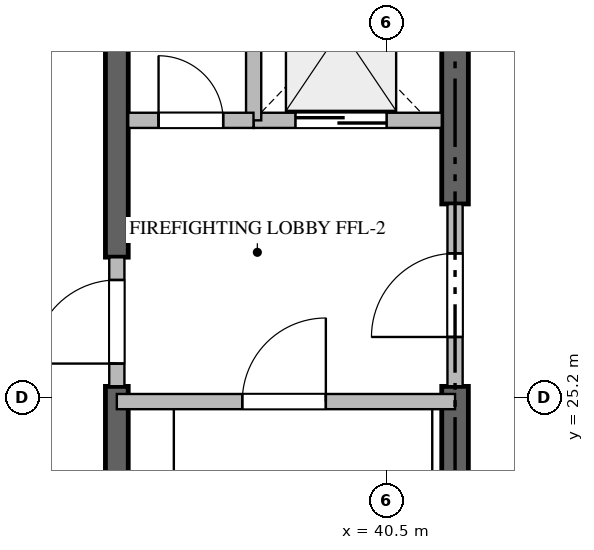
"""IFC4 building model, lengths in metres.
Left out: names, types, materials, properties, quantities, classifications, styles, units other than length and angle.
Written with IfcOpenShell. Run it as: python <this file> out.ifc"""

import sys

from ifc_helpers import new_model, si_unit, direction, frame, frame_2d, origin, place, context, subcontext, project, spatial, rectangle, extrude, source, transform, mapped, element, fill, save


model = new_model("IFC4")
c1 = context("Model", 3, precision=1e-05, world=origin(), true_north=direction((0.0, 1.0)))
c2 = subcontext(c1, "Body", "Model", "MODEL_VIEW")
j1 = project(units=[si_unit("LENGTHUNIT", "METRE"), si_unit("PLANEANGLEUNIT", "RADIAN")], contexts=[c1])
p1 = place(None, origin())
s1 = spatial("IfcSite", under=j1, at=p1, CompositionType="ELEMENT")
p2 = place(p1, origin())
s2 = spatial("IfcBuilding", under=s1, at=p2, CompositionType="ELEMENT")
p3 = place(p2, frame((0.0, 0.0, 353.85)))
s3 = spatial("IfcBuildingStorey", under=s2, at=p3, CompositionType="ELEMENT", Elevation=353.85)
p4 = place(p3, frame((41.4, 16.975, -0.26), z_axis=(0.0, 0.0, 1.0), x_axis=(0.0, 1.0, 0.0)))
e1 = element("IfcWall", 1, at=p4, inside=s3, PredefinedType="SHEAR", context=c2, shape_type="SweptSolid", body=[
    extrude(rectangle(XDim=8.375, YDim=0.35, at=frame_2d((4.188, 0.0))), origin(), (0.0, 0.0, 1.0), 5.798),
])
p5 = place(p3, frame((41.4, 27.75, -0.26), z_axis=(0.0, 0.0, 1.0), x_axis=(0.0, 1.0, 0.0)))
e2 = element("IfcWall", 2, at=p5, inside=s3, PredefinedType="SHEAR", context=c2, shape_type="SweptSolid", body=[
    extrude(rectangle(XDim=5.675, YDim=0.35, at=frame_2d((2.837, 0.0))), origin(), (0.0, 0.0, 1.0), 5.798),
])
p6 = place(p3, frame((36.95, 16.975, -0.26), z_axis=(0.0, 0.0, 1.0), x_axis=(0.0, 1.0, 0.0)))
e3 = element("IfcWall", 3, at=p6, inside=s3, PredefinedType="SHEAR", context=c2, shape_type="SweptSolid", body=[
    extrude(rectangle(XDim=8.375, YDim=0.3, at=frame_2d((4.188, 0.0))), origin(), (0.0, 0.0, 1.0), 5.798),
])
p7 = place(p3, frame((36.95, 27.05, -0.26), z_axis=(0.0, 0.0, 1.0), x_axis=(0.0, 1.0, 0.0)))
e4 = element("IfcWall", 4, at=p7, inside=s3, PredefinedType="SHEAR", context=c2, shape_type="SweptSolid", body=[
    extrude(rectangle(XDim=6.375, YDim=0.3, at=frame_2d((3.188, 0.0))), origin(), (0.0, 0.0, 1.0), 5.798),
])
p8 = place(p3, frame((36.95, 25.15, 0.0), z_axis=(0.0, 0.0, 1.0), x_axis=(1.0, 0.0, 0.0)))
e5 = element("IfcWall", 5, at=p8, inside=s3, PredefinedType="STANDARD", context=c2, shape_type="SweptSolid", body=[
    extrude(rectangle(XDim=4.45, YDim=0.2, at=frame_2d((2.225, 0.0))), origin(), (0.0, 0.0, 1.0), 5.54),
])
p9 = place(p8, frame((1.65, 0.0, 0.0)))
e6 = element("IfcOpeningElement", 6, at=p9, cuts=e5, PredefinedType="OPENING", context=c2, shape_type="SweptSolid", body=[
    extrude(rectangle(XDim=1.1, YDim=2.15, at=frame_2d((0.55, 1.075))), frame((0.0, 0.11, 0.0), z_axis=(0.0, -1.0, 0.0), x_axis=(1.0, 0.0, 0.0)), (0.0, 0.0, 1.0), 0.22),
])
p10 = place(p3, frame((38.75, 28.85, 0.0), z_axis=(0.0, 0.0, 1.0), x_axis=(1.0, 0.0, 0.0)))
e7 = element("IfcWall", 7, at=p10, inside=s3, PredefinedType="STANDARD", context=c2, shape_type="SweptSolid", body=[
    extrude(rectangle(XDim=2.475, YDim=0.2, at=frame_2d((1.238, 0.0))), origin(), (0.0, 0.0, 1.0), 5.54),
])
p11 = place(p10, frame((0.55, 0.0, 0.0)))
e8 = element("IfcOpeningElement", 8, at=p11, cuts=e7, PredefinedType="OPENING", context=c2, shape_type="SweptSolid", body=[
    extrude(rectangle(XDim=1.2, YDim=2.2, at=frame_2d((0.6, 1.1))), frame((0.0, 0.11, 0.0), z_axis=(0.0, -1.0, 0.0), x_axis=(1.0, 0.0, 0.0)), (0.0, 0.0, 1.0), 0.22),
])
p12 = place(p3, frame((38.75, 28.85, 0.0), z_axis=(0.0, 0.0, 1.0), x_axis=(0.0, 1.0, 0.0)))
e9 = element("IfcWall", 9, at=p12, inside=s3, PredefinedType="STANDARD", context=c2, shape_type="SweptSolid", body=[
    extrude(rectangle(XDim=2.5, YDim=0.2, at=frame_2d((1.25, 0.0))), origin(), (0.0, 0.0, 1.0), 5.54),
])
p13 = place(p3, frame((37.1, 28.85, 0.0), z_axis=(0.0, 0.0, 1.0), x_axis=(1.0, 0.0, 0.0)))
e10 = element("IfcWall", 10, at=p13, inside=s3, PredefinedType="STANDARD", context=c2, shape_type="SweptSolid", body=[
    extrude(rectangle(XDim=1.648, YDim=0.2, at=frame_2d((0.824, 0.0))), origin(), (0.0, 0.0, 1.0), 5.54),
])
p14 = place(p13, frame((0.399, 0.0, 0.0)))
e11 = element("IfcOpeningElement", 11, at=p14, cuts=e10, PredefinedType="OPENING", context=c2, shape_type="SweptSolid", body=[
    extrude(rectangle(XDim=0.85, YDim=2.1, at=frame_2d((0.425, 1.05))), frame((0.0, 0.11, 0.0), z_axis=(0.0, -1.0, 0.0), x_axis=(1.0, 0.0, 0.0)), (0.0, 0.0, 1.0), 0.22),
])
p15 = place(p3, frame((41.4, 25.352, 0.0), z_axis=(0.0, 0.0, 1.0), x_axis=(0.0, 1.0, 0.0)))
e12 = element("IfcWall", 12, at=p15, inside=s3, PredefinedType="STANDARD", context=c2, shape_type="SweptSolid", body=[
    extrude(rectangle(XDim=2.396, YDim=0.2, at=frame_2d((1.198, 0.0))), origin(), (0.0, 0.0, 1.0), 5.54),
])
p16 = place(p15, frame((0.648, 0.0, 0.0)))
e13 = element("IfcOpeningElement", 13, at=p16, cuts=e12, PredefinedType="OPENING", context=c2, shape_type="SweptSolid", body=[
    extrude(rectangle(XDim=1.1, YDim=2.15, at=frame_2d((0.55, 1.075))), frame((0.0, 0.11, 0.0), z_axis=(0.0, -1.0, 0.0), x_axis=(1.0, 0.0, 0.0)), (0.0, 0.0, 1.0), 0.22),
])
p17 = place(p3, frame((36.95, 25.352, 0.0), z_axis=(0.0, 0.0, 1.0), x_axis=(0.0, 1.0, 0.0)))
e14 = element("IfcWall", 14, at=p17, inside=s3, PredefinedType="STANDARD", context=c2, shape_type="SweptSolid", body=[
    extrude(rectangle(XDim=1.696, YDim=0.2, at=frame_2d((0.848, 0.0))), origin(), (0.0, 0.0, 1.0), 5.54),
])
p18 = place(p17, frame((0.298, 0.0, 0.0)))
e15 = element("IfcOpeningElement", 15, at=p18, cuts=e14, PredefinedType="OPENING", context=c2, shape_type="SweptSolid", body=[
    extrude(rectangle(XDim=1.1, YDim=2.15, at=frame_2d((0.55, 1.075))), frame((0.0, 0.11, 0.0), z_axis=(0.0, -1.0, 0.0), x_axis=(1.0, 0.0, 0.0)), (0.0, 0.0, 1.0), 0.22),
])
m1 = source(origin(), c2, "Body", "SweptSolid", [
    extrude(rectangle(XDim=1.1, YDim=2.15, at=frame_2d((0.55, 1.075))), frame((0.0, 0.025, 0.0), z_axis=(0.0, -1.0, 0.0), x_axis=(1.0, 0.0, 0.0)), (0.0, 0.0, 1.0), 0.05),
])
p19 = place(p9, origin())
e16 = element("IfcDoor", 16, at=p19, inside=s3, OperationType="SINGLE_SWING_RIGHT", PredefinedType="DOOR", context=c2, shape_type="MappedRepresentation", body=[
    mapped(m1, transform((0.0, 0.0, 0.0), scale=1.0)),
])
fill(e6, e16)
m2 = source(origin(), c2, "Body", "SweptSolid", [
    extrude(rectangle(XDim=1.2, YDim=2.2, at=frame_2d((0.6, 1.1))), frame((0.0, 0.025, 0.0), z_axis=(0.0, -1.0, 0.0), x_axis=(1.0, 0.0, 0.0)), (0.0, 0.0, 1.0), 0.05),
])
p20 = place(p11, origin())
e17 = element("IfcDoor", 17, at=p20, inside=s3, OperationType="DOUBLE_DOOR_SLIDING", PredefinedType="DOOR", context=c2, shape_type="MappedRepresentation", body=[
    mapped(m2, transform((0.0, 0.0, 0.0), scale=1.0)),
])
fill(e8, e17)
m3 = source(origin(), c2, "Body", "SweptSolid", [
    extrude(rectangle(XDim=0.85, YDim=2.1, at=frame_2d((0.425, 1.05))), frame((0.0, 0.025, 0.0), z_axis=(0.0, -1.0, 0.0), x_axis=(1.0, 0.0, 0.0)), (0.0, 0.0, 1.0), 0.05),
])
p21 = place(p14, origin())
e18 = element("IfcDoor", 18, at=p21, inside=s3, OperationType="SINGLE_SWING_LEFT", PredefinedType="DOOR", context=c2, shape_type="MappedRepresentation", body=[
    mapped(m3, transform((0.0, 0.0, 0.0), scale=1.0)),
])
fill(e11, e18)
p22 = place(p16, origin())
e19 = element("IfcDoor", 19, at=p22, inside=s3, OperationType="SINGLE_SWING_LEFT", PredefinedType="DOOR", context=c2, shape_type="MappedRepresentation", body=[
    mapped(m1, transform((0.0, 0.0, 0.0), scale=1.0)),
])
fill(e13, e19)
p23 = place(p18, origin())
e20 = element("IfcDoor", 20, at=p23, inside=s3, OperationType="SINGLE_SWING_LEFT", PredefinedType="DOOR", context=c2, shape_type="MappedRepresentation", body=[
    mapped(m1, transform((0.0, 0.0, 0.0), scale=1.0)),
])
fill(e15, e20)
save(model, sys.argv[1])
